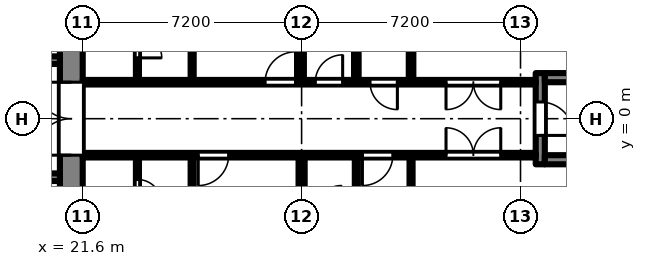
"""IFC4 building model, lengths in metres.
Left out: names, types, materials, properties, quantities, classifications, styles, units other than length and angle.
Written with IfcOpenShell. Run it as: python <this file> out.ifc"""

import sys

from ifc_helpers import new_model, si_unit, direction, frame, frame_2d, origin, place, context, subcontext, project, spatial, rectangle, extrude, element, fill, save


model = new_model("IFC4")
c1 = context("Model", 3, precision=1e-05, world=origin(), true_north=direction((0.0, 1.0)))
c2 = subcontext(c1, "Body", "Model", "MODEL_VIEW")
j1 = project(units=[si_unit("LENGTHUNIT", "METRE"), si_unit("PLANEANGLEUNIT", "RADIAN")], contexts=[c1])
p1 = place(None, origin())
s1 = spatial("IfcSite", under=j1, at=p1, CompositionType="ELEMENT")
p2 = place(p1, origin())
s2 = spatial("IfcBuilding", under=s1, at=p2, CompositionType="ELEMENT")
p3 = place(p2, frame((0.0, 0.0, 59.7)))
s3 = spatial("IfcBuildingStorey", under=s2, at=p3, CompositionType="ELEMENT", Elevation=59.7)
p4 = place(p3, frame((21.225, -7.2, 0.0), z_axis=(0.0, 0.0, 1.0), x_axis=(0.0, 1.0, 0.0)))
e1 = element("IfcWall", 1, at=p4, inside=s3, PredefinedType="SHEAR", context=c2, shape_type="SweptSolid", body=[
    extrude(rectangle(XDim=14.4, YDim=0.75, at=frame_2d((7.2, 0.0))), origin(), (0.0, 0.0, 1.0), 2.55),
])
p5 = place(p4, frame((6.0, 0.0, 0.0)))
e2 = element("IfcOpeningElement", 2, at=p5, cuts=e1, PredefinedType="OPENING", context=c2, shape_type="SweptSolid", body=[
    extrude(rectangle(XDim=2.4, YDim=2.2, at=frame_2d((1.2, 1.1))), frame((0.0, 0.385, 0.0), z_axis=(0.0, -1.0, 0.0), x_axis=(1.0, 0.0, 0.0)), (0.0, 0.0, 1.0), 0.77),
])
p6 = place(p3, frame((7.9, 1.925, 0.0), z_axis=(0.0, 0.0, 1.0), x_axis=(1.0, 0.0, 0.0)))
e3 = element("IfcWall", 3, at=p6, inside=s3, PredefinedType="SHEAR", context=c2, shape_type="SweptSolid", body=[
    extrude(rectangle(XDim=12.95, YDim=0.25, at=frame_2d((6.475, 0.0))), origin(), (0.0, 0.0, 1.0), 2.55),
])
p7 = place(p6, frame((0.525, 0.0, 0.0)))
e4 = element("IfcOpeningElement", 4, at=p7, cuts=e3, PredefinedType="OPENING", context=c2, shape_type="SweptSolid", body=[
    extrude(rectangle(XDim=0.9, YDim=2.1, at=frame_2d((0.45, 1.05))), frame((0.0, 0.135, 0.0), z_axis=(0.0, -1.0, 0.0), x_axis=(1.0, 0.0, 0.0)), (0.0, 0.0, 1.0), 0.27),
])
p8 = place(p6, frame((2.625, 0.0, 0.0)))
e5 = element("IfcOpeningElement", 5, at=p8, cuts=e3, PredefinedType="OPENING", context=c2, shape_type="SweptSolid", body=[
    extrude(rectangle(XDim=1.1, YDim=2.1, at=frame_2d((0.55, 1.05))), frame((0.0, 0.135, 0.0), z_axis=(0.0, -1.0, 0.0), x_axis=(1.0, 0.0, 0.0)), (0.0, 0.0, 1.0), 0.27),
])
p9 = place(p6, frame((6.025, 0.0, 0.0)))
e6 = element("IfcOpeningElement", 6, at=p9, cuts=e3, PredefinedType="OPENING", context=c2, shape_type="SweptSolid", body=[
    extrude(rectangle(XDim=0.9, YDim=2.1, at=frame_2d((0.45, 1.05))), frame((0.0, 0.135, 0.0), z_axis=(0.0, -1.0, 0.0), x_axis=(1.0, 0.0, 0.0)), (0.0, 0.0, 1.0), 0.27),
])
p10 = place(p6, frame((9.325, 0.0, 0.0)))
e7 = element("IfcOpeningElement", 7, at=p10, cuts=e3, PredefinedType="OPENING", context=c2, shape_type="SweptSolid", body=[
    extrude(rectangle(XDim=0.9, YDim=2.1, at=frame_2d((0.45, 1.05))), frame((0.0, 0.135, 0.0), z_axis=(0.0, -1.0, 0.0), x_axis=(1.0, 0.0, 0.0)), (0.0, 0.0, 1.0), 0.27),
])
p11 = place(p3, frame((7.9, -1.925, 0.0), z_axis=(0.0, 0.0, 1.0), x_axis=(1.0, 0.0, 0.0)))
e8 = element("IfcWall", 8, at=p11, inside=s3, PredefinedType="SHEAR", context=c2, shape_type="SweptSolid", body=[
    extrude(rectangle(XDim=12.95, YDim=0.25, at=frame_2d((6.475, 0.0))), origin(), (0.0, 0.0, 1.0), 2.55),
])
p12 = place(p11, frame((4.825, 0.0, 0.0)))
e9 = element("IfcOpeningElement", 9, at=p12, cuts=e8, PredefinedType="OPENING", context=c2, shape_type="SweptSolid", body=[
    extrude(rectangle(XDim=1.1, YDim=2.1, at=frame_2d((0.55, 1.05))), frame((0.0, 0.135, 0.0), z_axis=(0.0, -1.0, 0.0), x_axis=(1.0, 0.0, 0.0)), (0.0, 0.0, 1.0), 0.27),
])
p13 = place(p11, frame((7.025, 0.0, 0.0)))
e10 = element("IfcOpeningElement", 10, at=p13, cuts=e8, PredefinedType="OPENING", context=c2, shape_type="SweptSolid", body=[
    extrude(rectangle(XDim=1.1, YDim=2.1, at=frame_2d((0.55, 1.05))), frame((0.0, 0.135, 0.0), z_axis=(0.0, -1.0, 0.0), x_axis=(1.0, 0.0, 0.0)), (0.0, 0.0, 1.0), 0.27),
])
p14 = place(p11, frame((9.225, 0.0, 0.0)))
e11 = element("IfcOpeningElement", 11, at=p14, cuts=e8, PredefinedType="OPENING", context=c2, shape_type="SweptSolid", body=[
    extrude(rectangle(XDim=1.1, YDim=2.1, at=frame_2d((0.55, 1.05))), frame((0.0, 0.135, 0.0), z_axis=(0.0, -1.0, 0.0), x_axis=(1.0, 0.0, 0.0)), (0.0, 0.0, 1.0), 0.27),
])
p15 = place(p11, frame((0.525, 0.0, 0.0)))
e12 = element("IfcOpeningElement", 12, at=p15, cuts=e8, PredefinedType="OPENING", context=c2, shape_type="SweptSolid", body=[
    extrude(rectangle(XDim=0.9, YDim=2.1, at=frame_2d((0.45, 1.05))), frame((0.0, 0.135, 0.0), z_axis=(0.0, -1.0, 0.0), x_axis=(1.0, 0.0, 0.0)), (0.0, 0.0, 1.0), 0.27),
])
p16 = place(p11, frame((2.625, 0.0, 0.0)))
e13 = element("IfcOpeningElement", 13, at=p16, cuts=e8, PredefinedType="OPENING", context=c2, shape_type="SweptSolid", body=[
    extrude(rectangle(XDim=1.1, YDim=2.1, at=frame_2d((0.55, 1.05))), frame((0.0, 0.135, 0.0), z_axis=(0.0, -1.0, 0.0), x_axis=(1.0, 0.0, 0.0)), (0.0, 0.0, 1.0), 0.27),
])
p17 = place(p3, frame((36.65, -1.5, 0.0), z_axis=(0.0, 0.0, 1.0), x_axis=(0.0, 1.0, 0.0)))
e14 = element("IfcWall", 14, at=p17, inside=s3, PredefinedType="SHEAR", context=c2, shape_type="SweptSolid", body=[
    extrude(rectangle(XDim=3.0, YDim=0.3, at=frame_2d((1.5, 0.0))), origin(), (0.0, 0.0, 1.0), 2.55),
])
p18 = place(p17, frame((0.95, 0.0, 0.0)))
e15 = element("IfcOpeningElement", 15, at=p18, cuts=e14, PredefinedType="OPENING", context=c2, shape_type="SweptSolid", body=[
    extrude(rectangle(XDim=1.1, YDim=2.1, at=frame_2d((0.55, 1.05))), frame((0.0, 0.16, 0.0), z_axis=(0.0, -1.0, 0.0), x_axis=(1.0, 0.0, 0.0)), (0.0, 0.0, 1.0), 0.32),
])
for number, where, z_axis, x_axis in (
    (16, (36.8, -1.35, 0.0), (0.0, 0.0, 1.0), (1.0, 0.0, 0.0)),
    (17, (36.8, 1.35, 0.0), (0.0, 0.0, 1.0), (1.0, 0.0, 0.0)),
):
    element("IfcWall", number, at=place(p3, frame(where, z_axis=z_axis, x_axis=x_axis)), inside=s3, PredefinedType="SHEAR", context=c2, shape_type="SweptSolid", body=[
        extrude(rectangle(XDim=5.8, YDim=0.3, at=frame_2d((2.9, 0.0))), origin(), (0.0, 0.0, 1.0), 2.55),
    ])
p19 = place(p3, frame((21.6, -1.2, 0.0), z_axis=(0.0, 0.0, 1.0), x_axis=(1.0, 0.0, 0.0)))
e18 = element("IfcWall", 18, at=p19, inside=s3, PredefinedType="PARTITIONING", context=c2, shape_type="SweptSolid", body=[
    extrude(rectangle(XDim=14.9, YDim=0.15, at=frame_2d((7.45, 0.0))), origin(), (0.0, 0.0, 1.0), 2.55),
])
p20 = place(p19, frame((3.8, 0.0, 0.0)))
e19 = element("IfcOpeningElement", 19, at=p20, cuts=e18, PredefinedType="OPENING", context=c2, shape_type="SweptSolid", body=[
    extrude(rectangle(XDim=1.0, YDim=2.1, at=frame_2d((0.5, 1.05))), frame((0.0, 0.085, 0.0), z_axis=(0.0, -1.0, 0.0), x_axis=(1.0, 0.0, 0.0)), (0.0, 0.0, 1.0), 0.17),
])
p21 = place(p19, frame((9.2, 0.0, 0.0)))
e20 = element("IfcOpeningElement", 20, at=p21, cuts=e18, PredefinedType="OPENING", context=c2, shape_type="SweptSolid", body=[
    extrude(rectangle(XDim=1.0, YDim=2.1, at=frame_2d((0.5, 1.05))), frame((0.0, 0.085, 0.0), z_axis=(0.0, -1.0, 0.0), x_axis=(1.0, 0.0, 0.0)), (0.0, 0.0, 1.0), 0.17),
])
p22 = place(p19, frame((11.95, 0.0, 0.0)))
e21 = element("IfcOpeningElement", 21, at=p22, cuts=e18, PredefinedType="OPENING", context=c2, shape_type="SweptSolid", body=[
    extrude(rectangle(XDim=1.8, YDim=2.1, at=frame_2d((0.9, 1.05))), frame((0.0, 0.085, 0.0), z_axis=(0.0, -1.0, 0.0), x_axis=(1.0, 0.0, 0.0)), (0.0, 0.0, 1.0), 0.17),
])
p23 = place(p3, frame((21.6, 1.2, 0.0), z_axis=(0.0, 0.0, 1.0), x_axis=(1.0, 0.0, 0.0)))
e22 = element("IfcWall", 22, at=p23, inside=s3, PredefinedType="PARTITIONING", context=c2, shape_type="SweptSolid", body=[
    extrude(rectangle(XDim=14.9, YDim=0.15, at=frame_2d((7.45, 0.0))), origin(), (0.0, 0.0, 1.0), 2.55),
])
p24 = place(p23, frame((6.0, 0.0, 0.0)))
e23 = element("IfcOpeningElement", 23, at=p24, cuts=e22, PredefinedType="OPENING", context=c2, shape_type="SweptSolid", body=[
    extrude(rectangle(XDim=1.0, YDim=2.1, at=frame_2d((0.5, 1.05))), frame((0.0, 0.085, 0.0), z_axis=(0.0, -1.0, 0.0), x_axis=(1.0, 0.0, 0.0)), (0.0, 0.0, 1.0), 0.17),
])
p25 = place(p23, frame((7.65, 0.0, 0.0)))
e24 = element("IfcOpeningElement", 24, at=p25, cuts=e22, PredefinedType="OPENING", context=c2, shape_type="SweptSolid", body=[
    extrude(rectangle(XDim=0.9, YDim=2.1, at=frame_2d((0.45, 1.05))), frame((0.0, 0.085, 0.0), z_axis=(0.0, -1.0, 0.0), x_axis=(1.0, 0.0, 0.0)), (0.0, 0.0, 1.0), 0.17),
])
p26 = place(p23, frame((9.45, 0.0, 0.0)))
e25 = element("IfcOpeningElement", 25, at=p26, cuts=e22, PredefinedType="OPENING", context=c2, shape_type="SweptSolid", body=[
    extrude(rectangle(XDim=0.9, YDim=2.1, at=frame_2d((0.45, 1.05))), frame((0.0, 0.085, 0.0), z_axis=(0.0, -1.0, 0.0), x_axis=(1.0, 0.0, 0.0)), (0.0, 0.0, 1.0), 0.17),
])
p27 = place(p23, frame((11.95, 0.0, 0.0)))
e26 = element("IfcOpeningElement", 26, at=p27, cuts=e22, PredefinedType="OPENING", context=c2, shape_type="SweptSolid", body=[
    extrude(rectangle(XDim=1.8, YDim=2.1, at=frame_2d((0.9, 1.05))), frame((0.0, 0.085, 0.0), z_axis=(0.0, -1.0, 0.0), x_axis=(1.0, 0.0, 0.0)), (0.0, 0.0, 1.0), 0.17),
])
p28 = place(p3, frame((23.4, -3.65, 0.0), z_axis=(0.0, 0.0, 1.0), x_axis=(0.0, 1.0, 0.0)))
e27 = element("IfcWall", 27, at=p28, inside=s3, PredefinedType="PARTITIONING", context=c2, shape_type="SweptSolid", body=[
    extrude(rectangle(XDim=2.375, YDim=0.1, at=frame_2d((1.188, 0.0))), origin(), (0.0, 0.0, 1.0), 2.55),
])
p29 = place(p28, frame((0.85, 0.0, 0.0)))
e28 = element("IfcOpeningElement", 28, at=p29, cuts=e27, PredefinedType="OPENING", context=c2, shape_type="SweptSolid", body=[
    extrude(rectangle(XDim=0.8, YDim=2.1, at=frame_2d((0.4, 1.05))), frame((0.0, 0.06, 0.0), z_axis=(0.0, -1.0, 0.0), x_axis=(1.0, 0.0, 0.0)), (0.0, 0.0, 1.0), 0.12),
])
p30 = place(p3, frame((23.4, 1.275, 0.0), z_axis=(0.0, 0.0, 1.0), x_axis=(0.0, 1.0, 0.0)))
e29 = element("IfcWall", 29, at=p30, inside=s3, PredefinedType="PARTITIONING", context=c2, shape_type="SweptSolid", body=[
    extrude(rectangle(XDim=2.375, YDim=0.1, at=frame_2d((1.188, 0.0))), origin(), (0.0, 0.0, 1.0), 2.55),
])
p31 = place(p30, frame((0.725, 0.0, 0.0)))
e30 = element("IfcOpeningElement", 30, at=p31, cuts=e29, PredefinedType="OPENING", context=c2, shape_type="SweptSolid", body=[
    extrude(rectangle(XDim=0.8, YDim=2.1, at=frame_2d((0.4, 1.05))), frame((0.0, 0.06, 0.0), z_axis=(0.0, -1.0, 0.0), x_axis=(1.0, 0.0, 0.0)), (0.0, 0.0, 1.0), 0.12),
])
for number, where, z_axis, x_axis in (
    (31, (25.2, -3.55, 0.0), (0.0, 0.0, 1.0), (0.0, 1.0, 0.0)),
    (32, (25.2, 1.275, 0.0), (0.0, 0.0, 1.0), (0.0, 1.0, 0.0)),
):
    element("IfcWall", number, at=place(p3, frame(where, z_axis=z_axis, x_axis=x_axis)), inside=s3, PredefinedType="PARTITIONING", context=c2, shape_type="SweptSolid", body=[
        extrude(rectangle(XDim=2.275, YDim=0.1, at=frame_2d((1.138, 0.0))), origin(), (0.0, 0.0, 1.0), 2.55),
    ])
p32 = place(p3, frame((28.8, -6.9, 0.0), z_axis=(0.0, 0.0, 1.0), x_axis=(0.0, 1.0, 0.0)))
e33 = element("IfcWall", 33, at=p32, inside=s3, PredefinedType="PARTITIONING", context=c2, shape_type="SweptSolid", body=[
    extrude(rectangle(XDim=5.625, YDim=0.2, at=frame_2d((2.812, 0.0))), origin(), (0.0, 0.0, 1.0), 2.55),
])
p33 = place(p3, frame((28.8, 1.275, 0.0), z_axis=(0.0, 0.0, 1.0), x_axis=(0.0, 1.0, 0.0)))
e34 = element("IfcWall", 34, at=p33, inside=s3, PredefinedType="PARTITIONING", context=c2, shape_type="SweptSolid", body=[
    extrude(rectangle(XDim=5.625, YDim=0.15, at=frame_2d((2.812, 0.0))), origin(), (0.0, 0.0, 1.0), 2.55),
])
p34 = place(p3, frame((30.6, -2.95, 0.0), z_axis=(0.0, 0.0, 1.0), x_axis=(0.0, 1.0, 0.0)))
e35 = element("IfcWall", 35, at=p34, inside=s3, PredefinedType="PARTITIONING", context=c2, shape_type="SweptSolid", body=[
    extrude(rectangle(XDim=1.675, YDim=0.1, at=frame_2d((0.837, 0.0))), origin(), (0.0, 0.0, 1.0), 2.55),
])
p35 = place(p3, frame((30.6, 1.275, 0.0), z_axis=(0.0, 0.0, 1.0), x_axis=(0.0, 1.0, 0.0)))
e36 = element("IfcWall", 36, at=p35, inside=s3, PredefinedType="PARTITIONING", context=c2, shape_type="SweptSolid", body=[
    extrude(rectangle(XDim=5.625, YDim=0.15, at=frame_2d((2.812, 0.0))), origin(), (0.0, 0.0, 1.0), 2.55),
])
p36 = place(p3, frame((32.4, -6.9, 0.0), z_axis=(0.0, 0.0, 1.0), x_axis=(0.0, 1.0, 0.0)))
e37 = element("IfcWall", 37, at=p36, inside=s3, PredefinedType="PARTITIONING", context=c2, shape_type="SweptSolid", body=[
    extrude(rectangle(XDim=5.625, YDim=0.1, at=frame_2d((2.812, 0.0))), origin(), (0.0, 0.0, 1.0), 2.55),
])
p37 = place(p3, frame((32.4, 1.275, 0.0), z_axis=(0.0, 0.0, 1.0), x_axis=(0.0, 1.0, 0.0)))
e38 = element("IfcWall", 38, at=p37, inside=s3, PredefinedType="PARTITIONING", context=c2, shape_type="SweptSolid", body=[
    extrude(rectangle(XDim=5.625, YDim=0.15, at=frame_2d((2.812, 0.0))), origin(), (0.0, 0.0, 1.0), 2.55),
])
p38 = place(p5, origin())
e39 = element("IfcDoor", 39, at=p38, inside=s3, OperationType="DOUBLE_DOOR_DOUBLE_SWING", PredefinedType="DOOR", context=c2, shape_type="SweptSolid", body=[
    extrude(rectangle(XDim=2.4, YDim=2.2, at=frame_2d((1.2, 1.1))), frame((0.0, 0.025, 0.0), z_axis=(0.0, -1.0, 0.0), x_axis=(1.0, 0.0, 0.0)), (0.0, 0.0, 1.0), 0.05),
])
fill(e2, e39)
p39 = place(p18, frame((1.1, 0.0, 0.0), z_axis=(0.0, 0.0, 1.0), x_axis=(-1.0, 0.0, 0.0)))
e40 = element("IfcDoor", 40, at=p39, inside=s3, OperationType="SINGLE_SWING_RIGHT", PredefinedType="DOOR", context=c2, shape_type="SweptSolid", body=[
    extrude(rectangle(XDim=1.1, YDim=2.1, at=frame_2d((0.55, 1.05))), frame((0.0, 0.025, 0.0), z_axis=(0.0, -1.0, 0.0), x_axis=(1.0, 0.0, 0.0)), (0.0, 0.0, 1.0), 0.05),
])
fill(e15, e40)
p40 = place(p31, frame((0.8, 0.0, 0.0), z_axis=(0.0, 0.0, 1.0), x_axis=(-1.0, 0.0, 0.0)))
e41 = element("IfcDoor", 41, at=p40, inside=s3, OperationType="SINGLE_SWING_RIGHT", PredefinedType="DOOR", context=c2, shape_type="SweptSolid", body=[
    extrude(rectangle(XDim=0.8, YDim=2.1, at=frame_2d((0.4, 1.05))), frame((0.0, 0.025, 0.0), z_axis=(0.0, -1.0, 0.0), x_axis=(1.0, 0.0, 0.0)), (0.0, 0.0, 1.0), 0.05),
])
fill(e30, e41)
p41 = place(p24, origin())
e42 = element("IfcDoor", 42, at=p41, inside=s3, OperationType="SINGLE_SWING_RIGHT", PredefinedType="DOOR", context=c2, shape_type="SweptSolid", body=[
    extrude(rectangle(XDim=1.0, YDim=2.1, at=frame_2d((0.5, 1.05))), frame((0.0, 0.025, 0.0), z_axis=(0.0, -1.0, 0.0), x_axis=(1.0, 0.0, 0.0)), (0.0, 0.0, 1.0), 0.05),
])
fill(e23, e42)
p42 = place(p25, origin())
e43 = element("IfcDoor", 43, at=p42, inside=s3, OperationType="SINGLE_SWING_RIGHT", PredefinedType="DOOR", context=c2, shape_type="SweptSolid", body=[
    extrude(rectangle(XDim=0.9, YDim=2.1, at=frame_2d((0.45, 1.05))), frame((0.0, 0.025, 0.0), z_axis=(0.0, -1.0, 0.0), x_axis=(1.0, 0.0, 0.0)), (0.0, 0.0, 1.0), 0.05),
])
fill(e24, e43)
p43 = place(p26, frame((0.9, 0.0, 0.0), z_axis=(0.0, 0.0, 1.0), x_axis=(-1.0, 0.0, 0.0)))
e44 = element("IfcDoor", 44, at=p43, inside=s3, OperationType="SINGLE_SWING_LEFT", PredefinedType="DOOR", context=c2, shape_type="SweptSolid", body=[
    extrude(rectangle(XDim=0.9, YDim=2.1, at=frame_2d((0.45, 1.05))), frame((0.0, 0.025, 0.0), z_axis=(0.0, -1.0, 0.0), x_axis=(1.0, 0.0, 0.0)), (0.0, 0.0, 1.0), 0.05),
])
fill(e25, e44)
p44 = place(p27, frame((1.8, 0.0, 0.0), z_axis=(0.0, 0.0, 1.0), x_axis=(-1.0, 0.0, 0.0)))
e45 = element("IfcDoor", 45, at=p44, inside=s3, OperationType="DOUBLE_DOOR_DOUBLE_SWING", PredefinedType="DOOR", context=c2, shape_type="SweptSolid", body=[
    extrude(rectangle(XDim=1.8, YDim=2.1, at=frame_2d((0.9, 1.05))), frame((0.0, 0.025, 0.0), z_axis=(0.0, -1.0, 0.0), x_axis=(1.0, 0.0, 0.0)), (0.0, 0.0, 1.0), 0.05),
])
fill(e26, e45)
p45 = place(p29, frame((0.8, 0.0, 0.0), z_axis=(0.0, 0.0, 1.0), x_axis=(-1.0, 0.0, 0.0)))
e46 = element("IfcDoor", 46, at=p45, inside=s3, OperationType="SINGLE_SWING_RIGHT", PredefinedType="DOOR", context=c2, shape_type="SweptSolid", body=[
    extrude(rectangle(XDim=0.8, YDim=2.1, at=frame_2d((0.4, 1.05))), frame((0.0, 0.025, 0.0), z_axis=(0.0, -1.0, 0.0), x_axis=(1.0, 0.0, 0.0)), (0.0, 0.0, 1.0), 0.05),
])
fill(e28, e46)
p46 = place(p20, frame((1.0, 0.0, 0.0), z_axis=(0.0, 0.0, 1.0), x_axis=(-1.0, 0.0, 0.0)))
e47 = element("IfcDoor", 47, at=p46, inside=s3, OperationType="SINGLE_SWING_RIGHT", PredefinedType="DOOR", context=c2, shape_type="SweptSolid", body=[
    extrude(rectangle(XDim=1.0, YDim=2.1, at=frame_2d((0.5, 1.05))), frame((0.0, 0.025, 0.0), z_axis=(0.0, -1.0, 0.0), x_axis=(1.0, 0.0, 0.0)), (0.0, 0.0, 1.0), 0.05),
])
fill(e19, e47)
p47 = place(p21, frame((1.0, 0.0, 0.0), z_axis=(0.0, 0.0, 1.0), x_axis=(-1.0, 0.0, 0.0)))
e48 = element("IfcDoor", 48, at=p47, inside=s3, OperationType="SINGLE_SWING_RIGHT", PredefinedType="DOOR", context=c2, shape_type="SweptSolid", body=[
    extrude(rectangle(XDim=1.0, YDim=2.1, at=frame_2d((0.5, 1.05))), frame((0.0, 0.025, 0.0), z_axis=(0.0, -1.0, 0.0), x_axis=(1.0, 0.0, 0.0)), (0.0, 0.0, 1.0), 0.05),
])
fill(e20, e48)
p48 = place(p22, origin())
e49 = element("IfcDoor", 49, at=p48, inside=s3, OperationType="DOUBLE_DOOR_DOUBLE_SWING", PredefinedType="DOOR", context=c2, shape_type="SweptSolid", body=[
    extrude(rectangle(XDim=1.8, YDim=2.1, at=frame_2d((0.9, 1.05))), frame((0.0, 0.025, 0.0), z_axis=(0.0, -1.0, 0.0), x_axis=(1.0, 0.0, 0.0)), (0.0, 0.0, 1.0), 0.05),
])
fill(e21, e49)
save(model, sys.argv[1])
